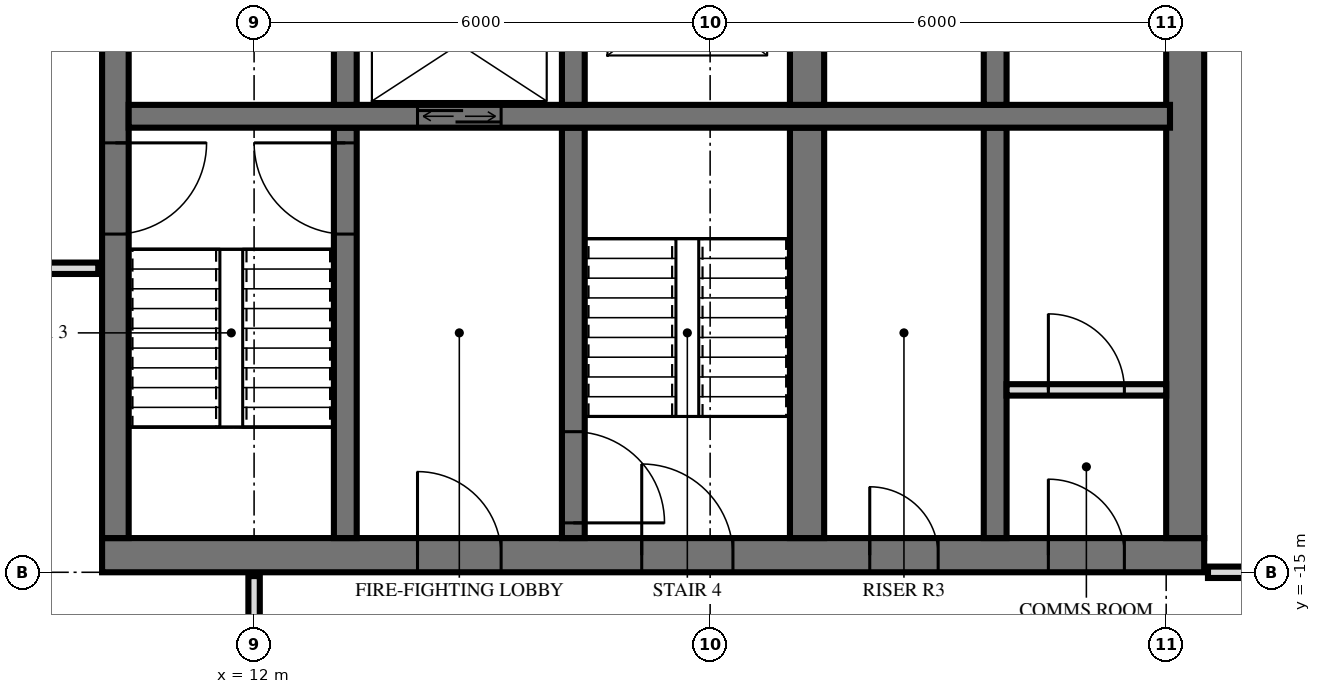
"""IFC4 building model, lengths in metres.
Left out: names, types, materials, properties, quantities, classifications, styles, units other than length and angle.
Written with IfcOpenShell. Run it as: python <this file> out.ifc"""

import sys

from ifc_helpers import new_model, si_unit, direction, frame, frame_2d, origin, place, context, subcontext, project, spatial, rectangle, extrude, element, fill, save


model = new_model("IFC4")
c1 = context("Model", 3, precision=1e-05, world=origin(), true_north=direction((0.0, 1.0)))
c2 = subcontext(c1, "Body", "Model", "MODEL_VIEW")
j1 = project(units=[si_unit("LENGTHUNIT", "METRE"), si_unit("PLANEANGLEUNIT", "RADIAN")], contexts=[c1])
p1 = place(None, origin())
s1 = spatial("IfcSite", under=j1, at=p1, CompositionType="ELEMENT")
p2 = place(p1, origin())
s2 = spatial("IfcBuilding", under=s1, at=p2, CompositionType="ELEMENT")
p3 = place(p2, frame((0.0, 0.0, 138.0)))
s3 = spatial("IfcBuildingStorey", under=s2, at=p3, CompositionType="ELEMENT", Elevation=138.0)
p4 = place(p3, frame((10.0, -14.775, 0.0), z_axis=(0.0, 0.0, 1.0), x_axis=(1.0, 0.0, 0.0)))
e1 = element("IfcWall", 1, at=p4, inside=s3, PredefinedType="SHEAR", context=c2, shape_type="SweptSolid", body=[
    extrude(rectangle(XDim=14.5, YDim=0.45, at=frame_2d((7.25, 0.0))), origin(), (0.0, 0.0, 1.0), 3.6),
])
p5 = place(p4, frame((7.1, 0.0, 0.0)))
e2 = element("IfcOpeningElement", 2, at=p5, cuts=e1, PredefinedType="OPENING", context=c2, shape_type="SweptSolid", body=[
    extrude(rectangle(XDim=1.2, YDim=2.1, at=frame_2d((0.6, 1.05))), frame((0.0, 0.235, 0.0), z_axis=(0.0, -1.0, 0.0), x_axis=(1.0, 0.0, 0.0)), (0.0, 0.0, 1.0), 0.47),
])
p6 = place(p4, frame((4.15, 0.0, 0.0)))
e3 = element("IfcOpeningElement", 3, at=p6, cuts=e1, PredefinedType="OPENING", context=c2, shape_type="SweptSolid", body=[
    extrude(rectangle(XDim=1.1, YDim=2.1, at=frame_2d((0.55, 1.05))), frame((0.0, 0.235, 0.0), z_axis=(0.0, -1.0, 0.0), x_axis=(1.0, 0.0, 0.0)), (0.0, 0.0, 1.0), 0.47),
])
p7 = place(p4, frame((10.1, 0.0, 0.0)))
e4 = element("IfcOpeningElement", 4, at=p7, cuts=e1, PredefinedType="OPENING", context=c2, shape_type="SweptSolid", body=[
    extrude(rectangle(XDim=0.9, YDim=2.1, at=frame_2d((0.45, 1.05))), frame((0.0, 0.235, 0.0), z_axis=(0.0, -1.0, 0.0), x_axis=(1.0, 0.0, 0.0)), (0.0, 0.0, 1.0), 0.47),
])
p8 = place(p4, frame((12.45, 0.0, 0.0)))
e5 = element("IfcOpeningElement", 5, at=p8, cuts=e1, PredefinedType="OPENING", context=c2, shape_type="SweptSolid", body=[
    extrude(rectangle(XDim=1.0, YDim=2.1, at=frame_2d((0.5, 1.05))), frame((0.0, 0.235, 0.0), z_axis=(0.0, -1.0, 0.0), x_axis=(1.0, 0.0, 0.0)), (0.0, 0.0, 1.0), 0.47),
])
p9 = place(p3, frame((10.175, -14.55, 0.0), z_axis=(0.0, 0.0, 1.0), x_axis=(0.0, 1.0, 0.0)))
e6 = element("IfcWall", 6, at=p9, inside=s3, PredefinedType="SHEAR", context=c2, shape_type="SweptSolid", body=[
    extrude(rectangle(XDim=14.1, YDim=0.35, at=frame_2d((7.05, 0.0))), origin(), (0.0, 0.0, 1.0), 3.6),
])
p10 = place(p9, frame((8.4, 0.0, 0.0)))
e7 = element("IfcOpeningElement", 7, at=p10, cuts=e6, PredefinedType="OPENING", context=c2, shape_type="SweptSolid", body=[
    extrude(rectangle(XDim=1.4, YDim=2.4, at=frame_2d((0.7, 1.2))), frame((0.0, 0.185, 0.0), z_axis=(0.0, -1.0, 0.0), x_axis=(1.0, 0.0, 0.0)), (0.0, 0.0, 1.0), 0.37),
])
p11 = place(p9, frame((10.0, 0.0, 0.0)))
e8 = element("IfcOpeningElement", 8, at=p11, cuts=e6, PredefinedType="OPENING", context=c2, shape_type="SweptSolid", body=[
    extrude(rectangle(XDim=1.4, YDim=2.4, at=frame_2d((0.7, 1.2))), frame((0.0, 0.185, 0.0), z_axis=(0.0, -1.0, 0.0), x_axis=(1.0, 0.0, 0.0)), (0.0, 0.0, 1.0), 0.37),
])
p12 = place(p9, frame((4.0, 0.0, 0.0)))
e9 = element("IfcOpeningElement", 9, at=p12, cuts=e6, PredefinedType="OPENING", context=c2, shape_type="SweptSolid", body=[
    extrude(rectangle(XDim=1.2, YDim=2.1, at=frame_2d((0.6, 1.05))), frame((0.0, 0.185, 0.0), z_axis=(0.0, -1.0, 0.0), x_axis=(1.0, 0.0, 0.0)), (0.0, 0.0, 1.0), 0.37),
])
p13 = place(p3, frame((24.25, -14.55, 0.0), z_axis=(0.0, 0.0, 1.0), x_axis=(0.0, 1.0, 0.0)))
e10 = element("IfcWall", 10, at=p13, inside=s3, PredefinedType="SHEAR", context=c2, shape_type="SweptSolid", body=[
    extrude(rectangle(XDim=14.1, YDim=0.5, at=frame_2d((7.05, 0.0))), origin(), (0.0, 0.0, 1.0), 3.6),
])
p14 = place(p3, frame((10.35, -9.0, 0.0), z_axis=(0.0, 0.0, 1.0), x_axis=(1.0, 0.0, 0.0)))
e11 = element("IfcWall", 11, at=p14, inside=s3, PredefinedType="SHEAR", context=c2, shape_type="SweptSolid", body=[
    extrude(rectangle(XDim=13.7, YDim=0.3, at=frame_2d((6.85, 0.0))), origin(), (0.0, 0.0, 1.0), 3.6),
])
p15 = place(p14, frame((3.8, 0.0, 0.0)))
e12 = element("IfcOpeningElement", 12, at=p15, cuts=e11, PredefinedType="OPENING", context=c2, shape_type="SweptSolid", body=[
    extrude(rectangle(XDim=1.1, YDim=2.1, at=frame_2d((0.55, 1.05))), frame((0.0, 0.16, 0.0), z_axis=(0.0, -1.0, 0.0), x_axis=(1.0, 0.0, 0.0)), (0.0, 0.0, 1.0), 0.32),
])
p16 = place(p3, frame((13.2, -8.85, 0.0), z_axis=(0.0, 0.0, 1.0), x_axis=(0.0, 1.0, 0.0)))
e13 = element("IfcWall", 13, at=p16, inside=s3, PredefinedType="SHEAR", context=c2, shape_type="SweptSolid", body=[
    extrude(rectangle(XDim=2.3, YDim=0.3, at=frame_2d((1.15, 0.0))), origin(), (0.0, 0.0, 1.0), 3.6),
])
p17 = place(p3, frame((13.2, -14.55, 0.0), z_axis=(0.0, 0.0, 1.0), x_axis=(0.0, 1.0, 0.0)))
e14 = element("IfcWall", 14, at=p17, inside=s3, PredefinedType="SHEAR", context=c2, shape_type="SweptSolid", body=[
    extrude(rectangle(XDim=5.4, YDim=0.3, at=frame_2d((2.7, 0.0))), origin(), (0.0, 0.0, 1.0), 3.6),
])
p18 = place(p17, frame((4.0, 0.0, 0.0)))
e15 = element("IfcOpeningElement", 15, at=p18, cuts=e14, PredefinedType="OPENING", context=c2, shape_type="SweptSolid", body=[
    extrude(rectangle(XDim=1.2, YDim=2.1, at=frame_2d((0.6, 1.05))), frame((0.0, 0.16, 0.0), z_axis=(0.0, -1.0, 0.0), x_axis=(1.0, 0.0, 0.0)), (0.0, 0.0, 1.0), 0.32),
])
p19 = place(p3, frame((16.2, -8.85, 0.0), z_axis=(0.0, 0.0, 1.0), x_axis=(0.0, 1.0, 0.0)))
e16 = element("IfcWall", 16, at=p19, inside=s3, PredefinedType="SHEAR", context=c2, shape_type="SweptSolid", body=[
    extrude(rectangle(XDim=2.3, YDim=0.3, at=frame_2d((1.15, 0.0))), origin(), (0.0, 0.0, 1.0), 3.6),
])
p20 = place(p3, frame((16.2, -14.55, 0.0), z_axis=(0.0, 0.0, 1.0), x_axis=(0.0, 1.0, 0.0)))
e17 = element("IfcWall", 17, at=p20, inside=s3, PredefinedType="SHEAR", context=c2, shape_type="SweptSolid", body=[
    extrude(rectangle(XDim=5.4, YDim=0.3, at=frame_2d((2.7, 0.0))), origin(), (0.0, 0.0, 1.0), 3.6),
])
p21 = place(p20, frame((0.2, 0.0, 0.0)))
e18 = element("IfcOpeningElement", 18, at=p21, cuts=e17, PredefinedType="OPENING", context=c2, shape_type="SweptSolid", body=[
    extrude(rectangle(XDim=1.2, YDim=2.1, at=frame_2d((0.6, 1.05))), frame((0.0, 0.16, 0.0), z_axis=(0.0, -1.0, 0.0), x_axis=(1.0, 0.0, 0.0)), (0.0, 0.0, 1.0), 0.32),
])
p22 = place(p3, frame((19.275, -8.85, 0.0), z_axis=(0.0, 0.0, 1.0), x_axis=(0.0, 1.0, 0.0)))
e19 = element("IfcWall", 19, at=p22, inside=s3, PredefinedType="SHEAR", context=c2, shape_type="SweptSolid", body=[
    extrude(rectangle(XDim=2.3, YDim=0.45, at=frame_2d((1.15, 0.0))), origin(), (0.0, 0.0, 1.0), 3.6),
])
p23 = place(p3, frame((19.275, -14.55, 0.0), z_axis=(0.0, 0.0, 1.0), x_axis=(0.0, 1.0, 0.0)))
e20 = element("IfcWall", 20, at=p23, inside=s3, PredefinedType="SHEAR", context=c2, shape_type="SweptSolid", body=[
    extrude(rectangle(XDim=5.4, YDim=0.45, at=frame_2d((2.7, 0.0))), origin(), (0.0, 0.0, 1.0), 3.6),
])
p24 = place(p3, frame((21.75, -8.85, 0.0), z_axis=(0.0, 0.0, 1.0), x_axis=(0.0, 1.0, 0.0)))
e21 = element("IfcWall", 21, at=p24, inside=s3, PredefinedType="SHEAR", context=c2, shape_type="SweptSolid", body=[
    extrude(rectangle(XDim=2.3, YDim=0.3, at=frame_2d((1.15, 0.0))), origin(), (0.0, 0.0, 1.0), 3.6),
])
p25 = place(p3, frame((21.75, -14.55, 0.0), z_axis=(0.0, 0.0, 1.0), x_axis=(0.0, 1.0, 0.0)))
e22 = element("IfcWall", 22, at=p25, inside=s3, PredefinedType="SHEAR", context=c2, shape_type="SweptSolid", body=[
    extrude(rectangle(XDim=5.4, YDim=0.3, at=frame_2d((2.7, 0.0))), origin(), (0.0, 0.0, 1.0), 3.6),
])
p26 = place(p3, frame((21.9, -12.6, 0.0), z_axis=(0.0, 0.0, 1.0), x_axis=(1.0, 0.0, 0.0)))
e23 = element("IfcWall", 23, at=p26, inside=s3, PredefinedType="PARTITIONING", context=c2, shape_type="SweptSolid", body=[
    extrude(rectangle(XDim=2.1, YDim=0.15, at=frame_2d((1.05, 0.0))), origin(), (0.0, 0.0, 1.0), 3.3),
])
p27 = place(p26, frame((0.55, 0.0, 0.0)))
e24 = element("IfcOpeningElement", 24, at=p27, cuts=e23, PredefinedType="OPENING", context=c2, shape_type="SweptSolid", body=[
    extrude(rectangle(XDim=1.0, YDim=2.1, at=frame_2d((0.5, 1.05))), frame((0.0, 0.085, 0.0), z_axis=(0.0, -1.0, 0.0), x_axis=(1.0, 0.0, 0.0)), (0.0, 0.0, 1.0), 0.17),
])
p28 = place(p3, frame((12.0, -17.4, 0.0), z_axis=(0.0, 0.0, 1.0), x_axis=(0.0, 1.0, 0.0)))
e25 = element("IfcWall", 25, at=p28, inside=s3, PredefinedType="PARTITIONING", context=c2, shape_type="SweptSolid", body=[
    extrude(rectangle(XDim=2.35, YDim=0.15, at=frame_2d((1.175, 0.0))), origin(), (0.0, 0.0, 1.0), 3.32),
])
p29 = place(p28, frame((0.7, 0.0, 0.0)))
e26 = element("IfcOpeningElement", 26, at=p29, cuts=e25, PredefinedType="OPENING", context=c2, shape_type="SweptSolid", body=[
    extrude(rectangle(XDim=1.0, YDim=2.1, at=frame_2d((0.5, 1.05))), frame((0.0, 0.085, 0.0), z_axis=(0.0, -1.0, 0.0), x_axis=(1.0, 0.0, 0.0)), (0.0, 0.0, 1.0), 0.17),
])
p30 = place(p3, frame((24.55, -15.0, 0.0), z_axis=(0.0, 0.0, 1.0), x_axis=(1.0, 0.0, 0.0)))
e27 = element("IfcWall", 27, at=p30, inside=s3, PredefinedType="PARTITIONING", context=c2, shape_type="SweptSolid", body=[
    extrude(rectangle(XDim=3.47, YDim=0.15, at=frame_2d((1.735, 0.0))), origin(), (0.0, 0.0, 1.0), 3.32),
])
p31 = place(p30, frame((0.9, 0.0, 0.0)))
e28 = element("IfcOpeningElement", 28, at=p31, cuts=e27, PredefinedType="OPENING", context=c2, shape_type="SweptSolid", body=[
    extrude(rectangle(XDim=1.0, YDim=2.1, at=frame_2d((0.5, 1.05))), frame((0.0, 0.085, 0.0), z_axis=(0.0, -1.0, 0.0), x_axis=(1.0, 0.0, 0.0)), (0.0, 0.0, 1.0), 0.17),
])
p32 = place(p3, frame((-9.95, -11.0, 0.0), z_axis=(0.0, 0.0, 1.0), x_axis=(1.0, 0.0, 0.0)))
e29 = element("IfcWall", 29, at=p32, inside=s3, PredefinedType="PARTITIONING", context=c2, shape_type="SweptSolid", body=[
    extrude(rectangle(XDim=19.9, YDim=0.15, at=frame_2d((9.95, 0.0))), origin(), (0.0, 0.0, 1.0), 3.32),
])
p33 = place(p32, frame((9.45, 0.0, 0.0)))
e30 = element("IfcOpeningElement", 30, at=p33, cuts=e29, PredefinedType="OPENING", context=c2, shape_type="SweptSolid", body=[
    extrude(rectangle(XDim=1.0, YDim=2.1, at=frame_2d((0.5, 1.05))), frame((0.0, 0.085, 0.0), z_axis=(0.0, -1.0, 0.0), x_axis=(1.0, 0.0, 0.0)), (0.0, 0.0, 1.0), 0.17),
])
p34 = place(p32, frame((15.45, 0.0, 0.0)))
e31 = element("IfcOpeningElement", 31, at=p34, cuts=e29, PredefinedType="OPENING", context=c2, shape_type="SweptSolid", body=[
    extrude(rectangle(XDim=1.0, YDim=2.1, at=frame_2d((0.5, 1.05))), frame((0.0, 0.085, 0.0), z_axis=(0.0, -1.0, 0.0), x_axis=(1.0, 0.0, 0.0)), (0.0, 0.0, 1.0), 0.17),
])
p35 = place(p15, origin())
e32 = element("IfcDoor", 32, at=p35, inside=s3, OperationType="DOUBLE_DOOR_SLIDING", PredefinedType="USERDEFINED", context=c2, shape_type="SweptSolid", body=[
    extrude(rectangle(XDim=1.1, YDim=2.1, at=frame_2d((0.55, 1.05))), frame((0.0, 0.025, 0.0), z_axis=(0.0, -1.0, 0.0), x_axis=(1.0, 0.0, 0.0)), (0.0, 0.0, 1.0), 0.05),
])
fill(e12, e32)
p36 = place(p12, frame((0.6, 0.0, 0.0), z_axis=(0.0, 0.0, 1.0), x_axis=(-1.0, 0.0, 0.0)))
e33 = element("IfcDoor", 33, at=p36, inside=s3, OperationType="SINGLE_SWING_RIGHT", PredefinedType="DOOR", context=c2, shape_type="SweptSolid", body=[
    extrude(rectangle(XDim=1.2, YDim=2.1, at=frame_2d((0.0, 1.05))), frame((0.0, -0.025, 0.0), z_axis=(0.0, 1.0, 0.0), x_axis=(-1.0, 0.0, 0.0)), (0.0, 0.0, 1.0), 0.05),
])
fill(e9, e33)
p37 = place(p5, origin())
e34 = element("IfcDoor", 34, at=p37, inside=s3, OperationType="SINGLE_SWING_RIGHT", PredefinedType="DOOR", context=c2, shape_type="SweptSolid", body=[
    extrude(rectangle(XDim=1.2, YDim=2.1, at=frame_2d((0.6, 1.05))), frame((0.0, 0.025, 0.0), z_axis=(0.0, -1.0, 0.0), x_axis=(1.0, 0.0, 0.0)), (0.0, 0.0, 1.0), 0.05),
])
fill(e2, e34)
p38 = place(p6, origin())
e35 = element("IfcDoor", 35, at=p38, inside=s3, OperationType="SINGLE_SWING_RIGHT", PredefinedType="DOOR", context=c2, shape_type="SweptSolid", body=[
    extrude(rectangle(XDim=1.1, YDim=2.1, at=frame_2d((0.55, 1.05))), frame((0.0, 0.025, 0.0), z_axis=(0.0, -1.0, 0.0), x_axis=(1.0, 0.0, 0.0)), (0.0, 0.0, 1.0), 0.05),
])
fill(e3, e35)
p39 = place(p7, origin())
e36 = element("IfcDoor", 36, at=p39, inside=s3, OperationType="SINGLE_SWING_RIGHT", PredefinedType="DOOR", context=c2, shape_type="SweptSolid", body=[
    extrude(rectangle(XDim=0.9, YDim=2.1, at=frame_2d((0.45, 1.05))), frame((0.0, 0.025, 0.0), z_axis=(0.0, -1.0, 0.0), x_axis=(1.0, 0.0, 0.0)), (0.0, 0.0, 1.0), 0.05),
])
fill(e4, e36)
p40 = place(p8, origin())
e37 = element("IfcDoor", 37, at=p40, inside=s3, OperationType="SINGLE_SWING_RIGHT", PredefinedType="DOOR", context=c2, shape_type="SweptSolid", body=[
    extrude(rectangle(XDim=1.0, YDim=2.1, at=frame_2d((0.5, 1.05))), frame((0.0, 0.025, 0.0), z_axis=(0.0, -1.0, 0.0), x_axis=(1.0, 0.0, 0.0)), (0.0, 0.0, 1.0), 0.05),
])
fill(e5, e37)
p41 = place(p18, origin())
e38 = element("IfcDoor", 38, at=p41, inside=s3, OperationType="SINGLE_SWING_LEFT", PredefinedType="DOOR", context=c2, shape_type="SweptSolid", body=[
    extrude(rectangle(XDim=1.2, YDim=2.1, at=frame_2d((0.6, 1.05))), frame((0.0, 0.025, 0.0), z_axis=(0.0, -1.0, 0.0), x_axis=(1.0, 0.0, 0.0)), (0.0, 0.0, 1.0), 0.05),
])
fill(e15, e38)
p42 = place(p21, frame((0.6, 0.0, 0.0), z_axis=(0.0, 0.0, 1.0), x_axis=(-1.0, 0.0, 0.0)))
e39 = element("IfcDoor", 39, at=p42, inside=s3, OperationType="SINGLE_SWING_LEFT", PredefinedType="DOOR", context=c2, shape_type="SweptSolid", body=[
    extrude(rectangle(XDim=1.2, YDim=2.1, at=frame_2d((0.0, 1.05))), frame((0.0, -0.025, 0.0), z_axis=(0.0, 1.0, 0.0), x_axis=(-1.0, 0.0, 0.0)), (0.0, 0.0, 1.0), 0.05),
])
fill(e18, e39)
p43 = place(p27, origin())
e40 = element("IfcDoor", 40, at=p43, inside=s3, OperationType="SINGLE_SWING_RIGHT", PredefinedType="DOOR", context=c2, shape_type="SweptSolid", body=[
    extrude(rectangle(XDim=1.0, YDim=2.1, at=frame_2d((0.5, 1.05))), frame((0.0, 0.025, 0.0), z_axis=(0.0, -1.0, 0.0), x_axis=(1.0, 0.0, 0.0)), (0.0, 0.0, 1.0), 0.05),
])
fill(e24, e40)
save(model, sys.argv[1])
